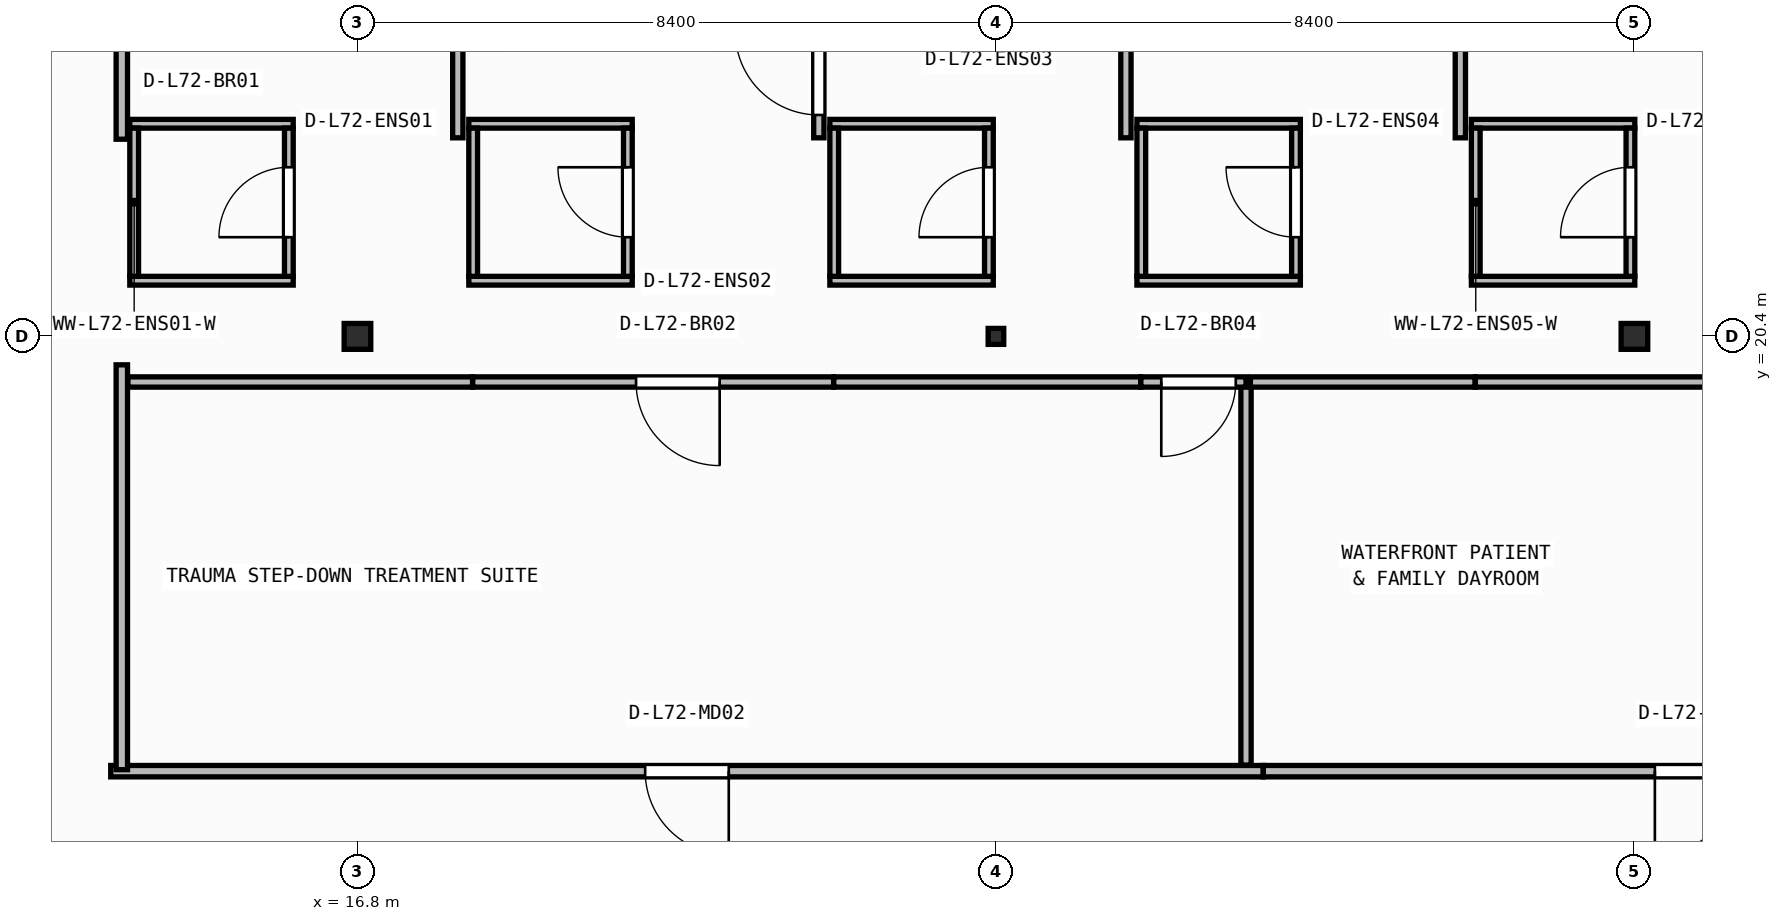
"""IFC4 building model, lengths in metres.
Left out: names, types, materials, properties, quantities, classifications, styles, units other than length and angle.
Written with IfcOpenShell. Run it as: python <this file> out.ifc"""

import sys

from ifc_helpers import new_model, si_unit, direction, frame, frame_2d, origin, origin_2d, place, context, subcontext, project, spatial, rectangle, i_section, extrude, element, fill, save


model = new_model("IFC4")
c1 = context("Model", 3, precision=1e-05, world=origin(), true_north=direction((0.0, 1.0)))
c2 = subcontext(c1, "Body", "Model", "MODEL_VIEW")
j1 = project(units=[si_unit("LENGTHUNIT", "METRE"), si_unit("PLANEANGLEUNIT", "RADIAN")], contexts=[c1])
p1 = place(None, origin())
s1 = spatial("IfcSite", under=j1, at=p1, CompositionType="ELEMENT")
p2 = place(p1, origin())
s2 = spatial("IfcBuilding", under=s1, at=p2, CompositionType="ELEMENT")
p3 = place(p2, frame((0.0, 0.0, 292.1)))
s3 = spatial("IfcBuildingStorey", under=s2, at=p3, CompositionType="ELEMENT", Elevation=292.1)
p4 = place(p3, frame((16.8, 20.4, 0.0), z_axis=(0.0, 0.0, 1.0), x_axis=(1.0, 0.0, 0.0)))
e1 = element("IfcColumn", 1, at=p4, inside=s3, PredefinedType="COLUMN", context=c2, shape_type="SweptSolid", body=[
    extrude(i_section(OverallWidth=0.35, OverallDepth=0.34, WebThickness=0.016, FlangeThickness=0.028, at=origin_2d()), origin(), (0.0, 0.0, 1.0), 3.95),
])
p5 = place(p3, frame((25.2, 20.4, 0.0), z_axis=(0.0, 0.0, 1.0), x_axis=(1.0, 0.0, 0.0)))
e2 = element("IfcColumn", 2, at=p5, inside=s3, PredefinedType="COLUMN", context=c2, shape_type="SweptSolid", body=[
    extrude(i_section(OverallWidth=0.205, OverallDepth=0.21, WebThickness=0.009, FlangeThickness=0.014, FilletRadius=0.011, at=origin_2d()), origin(), (0.0, 0.0, 1.0), 3.95),
])
p6 = place(p3, frame((33.6, 20.4, 0.0), z_axis=(0.0, 0.0, 1.0), x_axis=(1.0, 0.0, 0.0)))
e3 = element("IfcColumn", 3, at=p6, inside=s3, PredefinedType="COLUMN", context=c2, shape_type="SweptSolid", body=[
    extrude(i_section(OverallWidth=0.35, OverallDepth=0.34, WebThickness=0.016, FlangeThickness=0.028, at=origin_2d()), origin(), (0.0, 0.0, 1.0), 3.95),
])
for number, where, z_axis, x_axis in (
    (4, (13.805, 21.133, 0.0), (0.0, 0.0, 1.0), (1.0, 0.0, 0.0)),
    (5, (13.805, 23.198, 0.0), (0.0, 0.0, 1.0), (1.0, 0.0, 0.0)),
):
    element("IfcWall", number, at=place(p3, frame(where, z_axis=z_axis, x_axis=x_axis)), inside=s3, PredefinedType="PARTITIONING", context=c2, shape_type="SweptSolid", body=[
        extrude(rectangle(XDim=2.15, YDim=0.115, at=frame_2d((1.075, 0.0))), origin(), (0.0, 0.0, 1.0), 3.71),
    ])
p7 = place(p3, frame((13.863, 21.19, 0.0), z_axis=(0.0, 0.0, 1.0), x_axis=(0.0, 1.0, 0.0)))
e6 = element("IfcWall", 6, at=p7, inside=s3, PredefinedType="PARTITIONING", context=c2, shape_type="SweptSolid", body=[
    extrude(rectangle(XDim=1.95, YDim=0.115, at=frame_2d((0.975, 0.0))), origin(), (0.0, 0.0, 1.0), 3.71),
])
p8 = place(p3, frame((15.897, 21.19, 0.0), z_axis=(0.0, 0.0, 1.0), x_axis=(0.0, 1.0, 0.0)))
e7 = element("IfcWall", 7, at=p8, inside=s3, PredefinedType="PARTITIONING", context=c2, shape_type="SweptSolid", body=[
    extrude(rectangle(XDim=1.95, YDim=0.115, at=frame_2d((0.975, 0.0))), origin(), (0.0, 0.0, 1.0), 3.71),
])
p9 = place(p8, frame((0.515, 0.0, 0.0)))
e8 = element("IfcOpeningElement", 8, at=p9, cuts=e7, PredefinedType="OPENING", context=c2, shape_type="SweptSolid", body=[
    extrude(rectangle(XDim=0.92, YDim=2.1, at=frame_2d((0.46, 1.05))), frame((0.0, 0.067, 0.0), z_axis=(0.0, -1.0, 0.0), x_axis=(1.0, 0.0, 0.0)), (0.0, 0.0, 1.0), 0.135),
])
for number, where, z_axis, x_axis in (
    (9, (18.265, 21.133, 0.0), (0.0, 0.0, 1.0), (1.0, 0.0, 0.0)),
    (10, (18.265, 23.198, 0.0), (0.0, 0.0, 1.0), (1.0, 0.0, 0.0)),
):
    element("IfcWall", number, at=place(p3, frame(where, z_axis=z_axis, x_axis=x_axis)), inside=s3, PredefinedType="PARTITIONING", context=c2, shape_type="SweptSolid", body=[
        extrude(rectangle(XDim=2.15, YDim=0.115, at=frame_2d((1.075, 0.0))), origin(), (0.0, 0.0, 1.0), 3.71),
    ])
p10 = place(p3, frame((18.323, 21.19, 0.0), z_axis=(0.0, 0.0, 1.0), x_axis=(0.0, 1.0, 0.0)))
e11 = element("IfcWall", 11, at=p10, inside=s3, PredefinedType="PARTITIONING", context=c2, shape_type="SweptSolid", body=[
    extrude(rectangle(XDim=1.95, YDim=0.115, at=frame_2d((0.975, 0.0))), origin(), (0.0, 0.0, 1.0), 3.71),
])
p11 = place(p3, frame((20.357, 21.19, 0.0), z_axis=(0.0, 0.0, 1.0), x_axis=(0.0, 1.0, 0.0)))
e12 = element("IfcWall", 12, at=p11, inside=s3, PredefinedType="PARTITIONING", context=c2, shape_type="SweptSolid", body=[
    extrude(rectangle(XDim=1.95, YDim=0.115, at=frame_2d((0.975, 0.0))), origin(), (0.0, 0.0, 1.0), 3.71),
])
p12 = place(p11, frame((0.515, 0.0, 0.0)))
e13 = element("IfcOpeningElement", 13, at=p12, cuts=e12, PredefinedType="OPENING", context=c2, shape_type="SweptSolid", body=[
    extrude(rectangle(XDim=0.92, YDim=2.1, at=frame_2d((0.46, 1.05))), frame((0.0, 0.067, 0.0), z_axis=(0.0, -1.0, 0.0), x_axis=(1.0, 0.0, 0.0)), (0.0, 0.0, 1.0), 0.135),
])
for number, where, z_axis, x_axis in (
    (14, (23.015, 21.133, 0.0), (0.0, 0.0, 1.0), (1.0, 0.0, 0.0)),
    (15, (23.015, 23.198, 0.0), (0.0, 0.0, 1.0), (1.0, 0.0, 0.0)),
):
    element("IfcWall", number, at=place(p3, frame(where, z_axis=z_axis, x_axis=x_axis)), inside=s3, PredefinedType="PARTITIONING", context=c2, shape_type="SweptSolid", body=[
        extrude(rectangle(XDim=2.15, YDim=0.115, at=frame_2d((1.075, 0.0))), origin(), (0.0, 0.0, 1.0), 3.71),
    ])
p13 = place(p3, frame((23.073, 21.19, 0.0), z_axis=(0.0, 0.0, 1.0), x_axis=(0.0, 1.0, 0.0)))
e16 = element("IfcWall", 16, at=p13, inside=s3, PredefinedType="PARTITIONING", context=c2, shape_type="SweptSolid", body=[
    extrude(rectangle(XDim=1.95, YDim=0.115, at=frame_2d((0.975, 0.0))), origin(), (0.0, 0.0, 1.0), 3.71),
])
p14 = place(p3, frame((25.107, 21.19, 0.0), z_axis=(0.0, 0.0, 1.0), x_axis=(0.0, 1.0, 0.0)))
e17 = element("IfcWall", 17, at=p14, inside=s3, PredefinedType="PARTITIONING", context=c2, shape_type="SweptSolid", body=[
    extrude(rectangle(XDim=1.95, YDim=0.115, at=frame_2d((0.975, 0.0))), origin(), (0.0, 0.0, 1.0), 3.157),
])
p15 = place(p14, frame((0.515, 0.0, 0.0)))
e18 = element("IfcOpeningElement", 18, at=p15, cuts=e17, PredefinedType="OPENING", context=c2, shape_type="SweptSolid", body=[
    extrude(rectangle(XDim=0.92, YDim=2.1, at=frame_2d((0.46, 1.05))), frame((0.0, 0.067, 0.0), z_axis=(0.0, -1.0, 0.0), x_axis=(1.0, 0.0, 0.0)), (0.0, 0.0, 1.0), 0.135),
])
for number, where, z_axis, x_axis in (
    (19, (27.055, 21.133, 0.0), (0.0, 0.0, 1.0), (1.0, 0.0, 0.0)),
    (20, (27.055, 23.198, 0.0), (0.0, 0.0, 1.0), (1.0, 0.0, 0.0)),
):
    element("IfcWall", number, at=place(p3, frame(where, z_axis=z_axis, x_axis=x_axis)), inside=s3, PredefinedType="PARTITIONING", context=c2, shape_type="SweptSolid", body=[
        extrude(rectangle(XDim=2.15, YDim=0.115, at=frame_2d((1.075, 0.0))), origin(), (0.0, 0.0, 1.0), 3.71),
    ])
p16 = place(p3, frame((27.113, 21.19, 0.0), z_axis=(0.0, 0.0, 1.0), x_axis=(0.0, 1.0, 0.0)))
e21 = element("IfcWall", 21, at=p16, inside=s3, PredefinedType="PARTITIONING", context=c2, shape_type="SweptSolid", body=[
    extrude(rectangle(XDim=1.95, YDim=0.115, at=frame_2d((0.975, 0.0))), origin(), (0.0, 0.0, 1.0), 3.71),
])
p17 = place(p3, frame((29.147, 21.19, 0.0), z_axis=(0.0, 0.0, 1.0), x_axis=(0.0, 1.0, 0.0)))
e22 = element("IfcWall", 22, at=p17, inside=s3, PredefinedType="PARTITIONING", context=c2, shape_type="SweptSolid", body=[
    extrude(rectangle(XDim=1.95, YDim=0.115, at=frame_2d((0.975, 0.0))), origin(), (0.0, 0.0, 1.0), 3.71),
])
p18 = place(p17, frame((0.515, 0.0, 0.0)))
e23 = element("IfcOpeningElement", 23, at=p18, cuts=e22, PredefinedType="OPENING", context=c2, shape_type="SweptSolid", body=[
    extrude(rectangle(XDim=0.92, YDim=2.1, at=frame_2d((0.46, 1.05))), frame((0.0, 0.067, 0.0), z_axis=(0.0, -1.0, 0.0), x_axis=(1.0, 0.0, 0.0)), (0.0, 0.0, 1.0), 0.135),
])
for number, where, z_axis, x_axis in (
    (24, (31.455, 21.133, 0.0), (0.0, 0.0, 1.0), (1.0, 0.0, 0.0)),
    (25, (31.455, 23.198, 0.0), (0.0, 0.0, 1.0), (1.0, 0.0, 0.0)),
):
    element("IfcWall", number, at=place(p3, frame(where, z_axis=z_axis, x_axis=x_axis)), inside=s3, PredefinedType="PARTITIONING", context=c2, shape_type="SweptSolid", body=[
        extrude(rectangle(XDim=2.15, YDim=0.115, at=frame_2d((1.075, 0.0))), origin(), (0.0, 0.0, 1.0), 3.71),
    ])
p19 = place(p3, frame((31.512, 21.19, 0.0), z_axis=(0.0, 0.0, 1.0), x_axis=(0.0, 1.0, 0.0)))
e26 = element("IfcWall", 26, at=p19, inside=s3, PredefinedType="PARTITIONING", context=c2, shape_type="SweptSolid", body=[
    extrude(rectangle(XDim=1.95, YDim=0.115, at=frame_2d((0.975, 0.0))), origin(), (0.0, 0.0, 1.0), 3.71),
])
p20 = place(p3, frame((33.548, 21.19, 0.0), z_axis=(0.0, 0.0, 1.0), x_axis=(0.0, 1.0, 0.0)))
e27 = element("IfcWall", 27, at=p20, inside=s3, PredefinedType="PARTITIONING", context=c2, shape_type="SweptSolid", body=[
    extrude(rectangle(XDim=1.95, YDim=0.115, at=frame_2d((0.975, 0.0))), origin(), (0.0, 0.0, 1.0), 3.71),
])
p21 = place(p20, frame((0.515, 0.0, 0.0)))
e28 = element("IfcOpeningElement", 28, at=p21, cuts=e27, PredefinedType="OPENING", context=c2, shape_type="SweptSolid", body=[
    extrude(rectangle(XDim=0.92, YDim=2.1, at=frame_2d((0.46, 1.05))), frame((0.0, 0.067, 0.0), z_axis=(0.0, -1.0, 0.0), x_axis=(1.0, 0.0, 0.0)), (0.0, 0.0, 1.0), 0.135),
])
p22 = place(p3, frame((28.716, 14.68, 0.0), z_axis=(0.0, 0.0, 1.0), x_axis=(-1.0, 0.0, 0.0)))
e29 = element("IfcWall", 29, at=p22, inside=s3, PredefinedType="PARTITIONING", context=c2, shape_type="SweptSolid", body=[
    extrude(rectangle(XDim=15.162, YDim=0.15, at=frame_2d((7.581, 0.0))), origin(), (0.0, 0.0, 1.0), 3.71),
])
p23 = place(p22, frame((7.031, 0.0, 0.0)))
e30 = element("IfcOpeningElement", 30, at=p23, cuts=e29, PredefinedType="OPENING", context=c2, shape_type="SweptSolid", body=[
    extrude(rectangle(XDim=1.1, YDim=2.1, at=frame_2d((0.55, 1.05))), frame((0.0, 0.085, 0.0), z_axis=(0.0, -1.0, 0.0), x_axis=(1.0, 0.0, 0.0)), (0.0, 0.0, 1.0), 0.17),
])
p24 = place(p3, frame((40.12, 14.68, 0.0), z_axis=(0.0, 0.0, 1.0), x_axis=(-1.0, 0.0, 0.0)))
e31 = element("IfcWall", 31, at=p24, inside=s3, PredefinedType="PARTITIONING", context=c2, shape_type="SweptSolid", body=[
    extrude(rectangle(XDim=11.402, YDim=0.15, at=frame_2d((5.701, 0.0))), origin(), (0.0, 0.0, 1.0), 3.71),
])
p25 = place(p24, frame((5.151, 0.0, 0.0)))
e32 = element("IfcOpeningElement", 32, at=p25, cuts=e31, PredefinedType="OPENING", context=c2, shape_type="SweptSolid", body=[
    extrude(rectangle(XDim=1.1, YDim=2.1, at=frame_2d((0.55, 1.05))), frame((0.0, 0.085, 0.0), z_axis=(0.0, -1.0, 0.0), x_axis=(1.0, 0.0, 0.0)), (0.0, 0.0, 1.0), 0.17),
])
p26 = place(p3, frame((13.7, 14.7, 0.0), z_axis=(0.0, 0.0, 1.0), x_axis=(0.0, 1.0, 0.0)))
e33 = element("IfcWall", 33, at=p26, inside=s3, PredefinedType="PARTITIONING", context=c2, shape_type="SweptSolid", body=[
    extrude(rectangle(XDim=5.326, YDim=0.15, at=frame_2d((2.663, 0.0))), origin(), (0.0, 0.0, 1.0), 3.71),
])
p27 = place(p3, frame((13.7, 22.994, 0.0), z_axis=(0.0, 0.0, 1.0), x_axis=(0.0, 1.0, 0.0)))
e34 = element("IfcWall", 34, at=p27, inside=s3, PredefinedType="PARTITIONING", context=c2, shape_type="SweptSolid", body=[
    extrude(rectangle(XDim=3.606, YDim=0.15, at=frame_2d((1.803, 0.0))), origin(), (0.0, 0.0, 1.0), 3.71),
])
p28 = place(p27, frame((1.253, 0.0, 0.0)))
e35 = element("IfcOpeningElement", 35, at=p28, cuts=e34, PredefinedType="OPENING", context=c2, shape_type="SweptSolid", body=[
    extrude(rectangle(XDim=1.1, YDim=2.1, at=frame_2d((0.55, 1.05))), frame((0.0, 0.085, 0.0), z_axis=(0.0, -1.0, 0.0), x_axis=(1.0, 0.0, 0.0)), (0.0, 0.0, 1.0), 0.17),
])
p29 = place(p3, frame((28.49, 14.76, 0.0), z_axis=(0.0, 0.0, 1.0), x_axis=(0.0, 1.0, 0.0)))
e36 = element("IfcWall", 36, at=p29, inside=s3, PredefinedType="PARTITIONING", context=c2, shape_type="SweptSolid", body=[
    extrude(rectangle(XDim=5.04, YDim=0.135, at=frame_2d((2.52, 0.0))), origin(), (0.0, 0.0, 1.0), 3.71),
])
p30 = place(p3, frame((18.315, 19.8, 0.0), z_axis=(0.0, 0.0, 1.0), x_axis=(-1.0, 0.0, 0.0)))
e37 = element("IfcWall", 37, at=p30, inside=s3, PredefinedType="PARTITIONING", context=c2, shape_type="SweptSolid", body=[
    extrude(rectangle(XDim=4.535, YDim=0.135, at=frame_2d((2.267, 0.0))), origin(), (0.0, 0.0, 1.0), 3.71),
])
p31 = place(p3, frame((23.065, 19.8, 0.0), z_axis=(0.0, 0.0, 1.0), x_axis=(-1.0, 0.0, 0.0)))
e38 = element("IfcWall", 38, at=p31, inside=s3, PredefinedType="PARTITIONING", context=c2, shape_type="SweptSolid", body=[
    extrude(rectangle(XDim=4.748, YDim=0.135, at=frame_2d((2.374, 0.0))), origin(), (0.0, 0.0, 1.0), 3.71),
])
p32 = place(p31, frame((1.499, 0.0, 0.0)))
e39 = element("IfcOpeningElement", 39, at=p32, cuts=e38, PredefinedType="OPENING", context=c2, shape_type="SweptSolid", body=[
    extrude(rectangle(XDim=1.1, YDim=2.1, at=frame_2d((0.55, 1.05))), frame((0.0, 0.077, 0.0), z_axis=(0.0, -1.0, 0.0), x_axis=(1.0, 0.0, 0.0)), (0.0, 0.0, 1.0), 0.155),
])
p33 = place(p3, frame((27.104, 19.8, 0.0), z_axis=(0.0, 0.0, 1.0), x_axis=(-1.0, 0.0, 0.0)))
e40 = element("IfcWall", 40, at=p33, inside=s3, PredefinedType="PARTITIONING", context=c2, shape_type="SweptSolid", body=[
    extrude(rectangle(XDim=4.038, YDim=0.135, at=frame_2d((2.019, 0.0))), origin(), (0.0, 0.0, 1.0), 3.71),
])
p34 = place(p3, frame((28.49, 19.8, 0.0), z_axis=(0.0, 0.0, 1.0), x_axis=(-1.0, 0.0, 0.0)))
e41 = element("IfcWall", 41, at=p34, inside=s3, PredefinedType="PARTITIONING", context=c2, shape_type="SweptSolid", body=[
    extrude(rectangle(XDim=1.383, YDim=0.135, at=frame_2d((0.692, 0.0))), origin(), (0.0, 0.0, 1.0), 3.71),
])
p35 = place(p34, frame((0.135, 0.0, 0.0)))
e42 = element("IfcOpeningElement", 42, at=p35, cuts=e41, PredefinedType="OPENING", context=c2, shape_type="SweptSolid", body=[
    extrude(rectangle(XDim=0.98, YDim=2.1, at=frame_2d((0.49, 1.05))), frame((0.0, 0.077, 0.0), z_axis=(0.0, -1.0, 0.0), x_axis=(1.0, 0.0, 0.0)), (0.0, 0.0, 1.0), 0.155),
])
p36 = place(p3, frame((31.505, 19.8, 0.0), z_axis=(0.0, 0.0, 1.0), x_axis=(-1.0, 0.0, 0.0)))
e43 = element("IfcWall", 43, at=p36, inside=s3, PredefinedType="PARTITIONING", context=c2, shape_type="SweptSolid", body=[
    extrude(rectangle(XDim=2.957, YDim=0.135, at=frame_2d((1.479, 0.0))), origin(), (0.0, 0.0, 1.0), 3.71),
])
p37 = place(p3, frame((36.255, 19.8, 0.0), z_axis=(0.0, 0.0, 1.0), x_axis=(-1.0, 0.0, 0.0)))
e44 = element("IfcWall", 44, at=p37, inside=s3, PredefinedType="PARTITIONING", context=c2, shape_type="SweptSolid", body=[
    extrude(rectangle(XDim=4.748, YDim=0.135, at=frame_2d((2.374, 0.0))), origin(), (0.0, 0.0, 1.0), 3.71),
])
p38 = place(p37, frame((0.281, 0.0, 0.0)))
e45 = element("IfcOpeningElement", 45, at=p38, cuts=e44, PredefinedType="OPENING", context=c2, shape_type="SweptSolid", body=[
    extrude(rectangle(XDim=1.1, YDim=2.1, at=frame_2d((0.55, 1.05))), frame((0.0, 0.077, 0.0), z_axis=(0.0, -1.0, 0.0), x_axis=(1.0, 0.0, 0.0)), (0.0, 0.0, 1.0), 0.155),
])
p39 = place(p3, frame((18.12, 23.012, 0.0), z_axis=(0.0, 0.0, 1.0), x_axis=(0.0, 1.0, 0.0)))
e46 = element("IfcWall", 46, at=p39, inside=s3, PredefinedType="PARTITIONING", context=c2, shape_type="SweptSolid", body=[
    extrude(rectangle(XDim=3.508, YDim=0.135, at=frame_2d((1.754, 0.0))), origin(), (0.0, 0.0, 1.0), 3.71),
])
p40 = place(p3, frame((22.87, 23.012, 0.0), z_axis=(0.0, 0.0, 1.0), x_axis=(0.0, 1.0, 0.0)))
e47 = element("IfcWall", 47, at=p40, inside=s3, PredefinedType="PARTITIONING", context=c2, shape_type="SweptSolid", body=[
    extrude(rectangle(XDim=3.508, YDim=0.135, at=frame_2d((1.754, 0.0))), origin(), (0.0, 0.0, 1.0), 3.71),
])
p41 = place(p40, frame((0.3, 0.0, 0.0)))
e48 = element("IfcOpeningElement", 48, at=p41, cuts=e47, PredefinedType="OPENING", context=c2, shape_type="SweptSolid", body=[
    extrude(rectangle(XDim=1.1, YDim=2.1, at=frame_2d((0.55, 1.05))), frame((0.0, 0.077, 0.0), z_axis=(0.0, -1.0, 0.0), x_axis=(1.0, 0.0, 0.0)), (0.0, 0.0, 1.0), 0.155),
])
for number, where, z_axis, x_axis in (
    (49, (26.91, 23.012, 0.0), (0.0, 0.0, 1.0), (0.0, 1.0, 0.0)),
    (50, (31.31, 23.012, 0.0), (0.0, 0.0, 1.0), (0.0, 1.0, 0.0)),
):
    element("IfcWall", number, at=place(p3, frame(where, z_axis=z_axis, x_axis=x_axis)), inside=s3, PredefinedType="PARTITIONING", context=c2, shape_type="SweptSolid", body=[
        extrude(rectangle(XDim=3.508, YDim=0.135, at=frame_2d((1.754, 0.0))), origin(), (0.0, 0.0, 1.0), 3.71),
    ])
p42 = place(p9, origin())
e51 = element("IfcDoor", 51, at=p42, inside=s3, OperationType="SINGLE_SWING_LEFT", PredefinedType="DOOR", context=c2, shape_type="SweptSolid", body=[
    extrude(rectangle(XDim=0.92, YDim=2.1, at=frame_2d((0.46, 1.05))), frame((0.0, 0.025, 0.0), z_axis=(0.0, -1.0, 0.0), x_axis=(1.0, 0.0, 0.0)), (0.0, 0.0, 1.0), 0.05),
])
fill(e8, e51)
p43 = place(p12, origin())
e52 = element("IfcDoor", 52, at=p43, inside=s3, OperationType="SINGLE_SWING_RIGHT", PredefinedType="DOOR", context=c2, shape_type="SweptSolid", body=[
    extrude(rectangle(XDim=0.92, YDim=2.1, at=frame_2d((0.46, 1.05))), frame((0.0, 0.025, 0.0), z_axis=(0.0, -1.0, 0.0), x_axis=(1.0, 0.0, 0.0)), (0.0, 0.0, 1.0), 0.05),
])
fill(e13, e52)
p44 = place(p15, origin())
e53 = element("IfcDoor", 53, at=p44, inside=s3, OperationType="SINGLE_SWING_LEFT", PredefinedType="DOOR", context=c2, shape_type="SweptSolid", body=[
    extrude(rectangle(XDim=0.92, YDim=2.1, at=frame_2d((0.46, 1.05))), frame((0.0, 0.025, 0.0), z_axis=(0.0, -1.0, 0.0), x_axis=(1.0, 0.0, 0.0)), (0.0, 0.0, 1.0), 0.05),
])
fill(e18, e53)
p45 = place(p18, origin())
e54 = element("IfcDoor", 54, at=p45, inside=s3, OperationType="SINGLE_SWING_RIGHT", PredefinedType="DOOR", context=c2, shape_type="SweptSolid", body=[
    extrude(rectangle(XDim=0.92, YDim=2.1, at=frame_2d((0.46, 1.05))), frame((0.0, 0.025, 0.0), z_axis=(0.0, -1.0, 0.0), x_axis=(1.0, 0.0, 0.0)), (0.0, 0.0, 1.0), 0.05),
])
fill(e23, e54)
p46 = place(p21, origin())
e55 = element("IfcDoor", 55, at=p46, inside=s3, OperationType="SINGLE_SWING_LEFT", PredefinedType="DOOR", context=c2, shape_type="SweptSolid", body=[
    extrude(rectangle(XDim=0.92, YDim=2.1, at=frame_2d((0.46, 1.05))), frame((0.0, 0.025, 0.0), z_axis=(0.0, -1.0, 0.0), x_axis=(1.0, 0.0, 0.0)), (0.0, 0.0, 1.0), 0.05),
])
fill(e28, e55)
p47 = place(p23, origin())
e56 = element("IfcDoor", 56, at=p47, inside=s3, OperationType="SINGLE_SWING_LEFT", PredefinedType="DOOR", context=c2, shape_type="SweptSolid", body=[
    extrude(rectangle(XDim=1.1, YDim=2.1, at=frame_2d((0.55, 1.05))), frame((0.0, 0.025, 0.0), z_axis=(0.0, -1.0, 0.0), x_axis=(1.0, 0.0, 0.0)), (0.0, 0.0, 1.0), 0.05),
])
fill(e30, e56)
p48 = place(p25, origin())
e57 = element("IfcDoor", 57, at=p48, inside=s3, OperationType="SINGLE_SWING_RIGHT", PredefinedType="DOOR", context=c2, shape_type="SweptSolid", body=[
    extrude(rectangle(XDim=1.1, YDim=2.1, at=frame_2d((0.55, 1.05))), frame((0.0, 0.025, 0.0), z_axis=(0.0, -1.0, 0.0), x_axis=(1.0, 0.0, 0.0)), (0.0, 0.0, 1.0), 0.05),
])
fill(e32, e57)
p49 = place(p32, origin())
e58 = element("IfcDoor", 58, at=p49, inside=s3, OperationType="SINGLE_SWING_LEFT", PredefinedType="DOOR", context=c2, shape_type="SweptSolid", body=[
    extrude(rectangle(XDim=1.1, YDim=2.1, at=frame_2d((0.55, 1.05))), frame((0.0, 0.025, 0.0), z_axis=(0.0, -1.0, 0.0), x_axis=(1.0, 0.0, 0.0)), (0.0, 0.0, 1.0), 0.05),
])
fill(e39, e58)
p50 = place(p35, origin())
e59 = element("IfcDoor", 59, at=p50, inside=s3, OperationType="SINGLE_SWING_RIGHT", PredefinedType="DOOR", context=c2, shape_type="SweptSolid", body=[
    extrude(rectangle(XDim=0.98, YDim=2.1, at=frame_2d((0.49, 1.05))), frame((0.0, 0.025, 0.0), z_axis=(0.0, -1.0, 0.0), x_axis=(1.0, 0.0, 0.0)), (0.0, 0.0, 1.0), 0.05),
])
fill(e42, e59)
p51 = place(p41, origin())
e60 = element("IfcDoor", 60, at=p51, inside=s3, OperationType="SINGLE_SWING_RIGHT", PredefinedType="DOOR", context=c2, shape_type="SweptSolid", body=[
    extrude(rectangle(XDim=1.1, YDim=2.1, at=frame_2d((0.55, 1.05))), frame((0.0, 0.025, 0.0), z_axis=(0.0, -1.0, 0.0), x_axis=(1.0, 0.0, 0.0)), (0.0, 0.0, 1.0), 0.05),
])
fill(e48, e60)
save(model, sys.argv[1])
